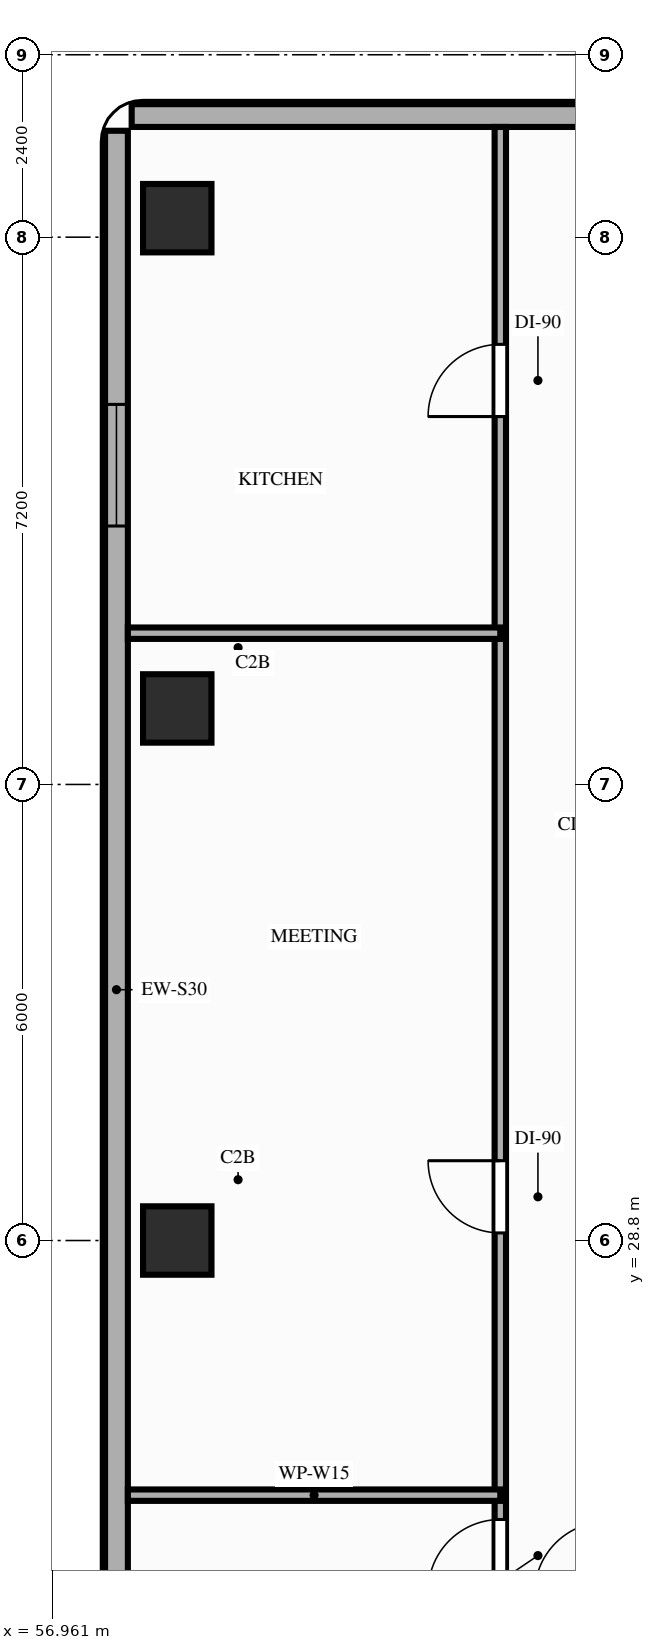
"""IFC4 building model, lengths in metres.
Left out: names, types, materials, properties, quantities, classifications, styles, units other than length and angle.
Written with IfcOpenShell. Run it as: python <this file> out.ifc"""

import sys

from ifc_helpers import new_model, si_unit, direction, frame, frame_2d, origin, origin_2d, place, context, subcontext, project, spatial, rectangle, extrude, element, fill, save


model = new_model("IFC4")
c1 = context("Model", 3, precision=1e-05, world=origin(), true_north=direction((0.0, 1.0)))
c2 = subcontext(c1, "Body", "Model", "MODEL_VIEW")
j1 = project(units=[si_unit("LENGTHUNIT", "METRE"), si_unit("PLANEANGLEUNIT", "RADIAN")], contexts=[c1])
p1 = place(None, origin())
s1 = spatial("IfcSite", under=j1, at=p1, CompositionType="ELEMENT")
p2 = place(p1, origin())
s2 = spatial("IfcBuilding", under=s1, at=p2, CompositionType="ELEMENT")
p3 = place(p2, frame((0.0, 0.0, 69.2)))
s3 = spatial("IfcBuildingStorey", under=s2, at=p3, CompositionType="ELEMENT", Elevation=69.2)
for number, where, z_axis, x_axis in (
    (1, (58.6, 28.8, 0.0), (0.0, 0.0, 1.0), (1.0, 0.0, 0.0)),
    (2, (58.6, 35.8, 0.0), (0.0, 0.0, 1.0), (1.0, 0.0, 0.0)),
    (3, (58.6, 42.25, 0.0), (0.0, 0.0, 1.0), (1.0, 0.0, 0.0)),
):
    element("IfcColumn", number, at=place(p3, frame(where, z_axis=z_axis, x_axis=x_axis)), inside=s3, PredefinedType="COLUMN", context=c2, shape_type="SweptSolid", body=[
        extrude(rectangle(XDim=0.9, YDim=0.9, at=origin_2d()), origin(), (0.0, 0.0, 1.0), 3.2),
    ])
p4 = place(p3, frame((57.8, 43.4, 0.0), z_axis=(0.0, 0.0, 1.0), x_axis=(0.0, -1.0, 0.0)))
e4 = element("IfcWall", 4, at=p4, inside=s3, PredefinedType="STANDARD", context=c2, shape_type="SweptSolid", body=[
    extrude(rectangle(XDim=22.6, YDim=0.3, at=frame_2d((11.3, 0.0))), origin(), (0.0, 0.0, 1.0), 2.6),
])
p5 = place(p4, frame((3.6, 0.0, 0.85)))
e5 = element("IfcOpeningElement", 5, at=p5, cuts=e4, PredefinedType="OPENING", context=c2, shape_type="SweptSolid", body=[
    extrude(rectangle(XDim=1.6, YDim=1.45, at=frame_2d((0.8, 0.725))), frame((0.0, 0.16, 0.0), z_axis=(0.0, -1.0, 0.0), x_axis=(1.0, 0.0, 0.0)), (0.0, 0.0, 1.0), 0.32),
])
p6 = place(p3, frame((72.8, 43.6, 0.0), z_axis=(0.0, 0.0, 1.0), x_axis=(-1.0, 0.0, 0.0)))
e6 = element("IfcWall", 6, at=p6, inside=s3, PredefinedType="STANDARD", context=c2, shape_type="SweptSolid", body=[
    extrude(rectangle(XDim=14.8, YDim=0.3, at=frame_2d((7.4, 0.0))), origin(), (0.0, 0.0, 1.0), 3.02),
])
p7 = place(p3, frame((62.85, 20.75, 0.0), z_axis=(0.0, 0.0, 1.0), x_axis=(0.0, 1.0, 0.0)))
e7 = element("IfcWall", 7, at=p7, inside=s3, PredefinedType="PARTITIONING", context=c2, shape_type="SweptSolid", body=[
    extrude(rectangle(XDim=22.7, YDim=0.15, at=frame_2d((11.35, 0.0))), origin(), (0.0, 0.0, 1.0), 2.6),
])
p8 = place(p7, frame((0.73, 0.0, 0.0)))
e8 = element("IfcOpeningElement", 8, at=p8, cuts=e7, PredefinedType="OPENING", context=c2, shape_type="SweptSolid", body=[
    extrude(rectangle(XDim=0.85, YDim=2.1, at=frame_2d((0.425, 1.05))), frame((0.0, 0.085, 0.0), z_axis=(0.0, -1.0, 0.0), x_axis=(1.0, 0.0, 0.0)), (0.0, 0.0, 1.0), 0.17),
])
p9 = place(p7, frame((3.43, 0.0, 0.0)))
e9 = element("IfcOpeningElement", 9, at=p9, cuts=e7, PredefinedType="OPENING", context=c2, shape_type="SweptSolid", body=[
    extrude(rectangle(XDim=0.95, YDim=2.1, at=frame_2d((0.475, 1.05))), frame((0.0, 0.085, 0.0), z_axis=(0.0, -1.0, 0.0), x_axis=(1.0, 0.0, 0.0)), (0.0, 0.0, 1.0), 0.17),
])
p10 = place(p7, frame((8.15, 0.0, 0.0)))
e10 = element("IfcOpeningElement", 10, at=p10, cuts=e7, PredefinedType="OPENING", context=c2, shape_type="SweptSolid", body=[
    extrude(rectangle(XDim=0.95, YDim=2.15, at=frame_2d((0.475, 1.075))), frame((0.0, 0.085, 0.0), z_axis=(0.0, -1.0, 0.0), x_axis=(1.0, 0.0, 0.0)), (0.0, 0.0, 1.0), 0.17),
])
p11 = place(p7, frame((18.89, 0.0, 0.0)))
e11 = element("IfcOpeningElement", 11, at=p11, cuts=e7, PredefinedType="OPENING", context=c2, shape_type="SweptSolid", body=[
    extrude(rectangle(XDim=0.95, YDim=2.15, at=frame_2d((0.475, 1.075))), frame((0.0, 0.085, 0.0), z_axis=(0.0, -1.0, 0.0), x_axis=(1.0, 0.0, 0.0)), (0.0, 0.0, 1.0), 0.17),
])
for number, where, z_axis, x_axis in (
    (12, (57.95, 25.45, 0.0), (0.0, 0.0, 1.0), (1.0, 0.0, 0.0)),
    (13, (57.95, 36.79, 0.0), (0.0, 0.0, 1.0), (1.0, 0.0, 0.0)),
):
    element("IfcWall", number, at=place(p3, frame(where, z_axis=z_axis, x_axis=x_axis)), inside=s3, PredefinedType="PARTITIONING", context=c2, shape_type="SweptSolid", body=[
        extrude(rectangle(XDim=4.9, YDim=0.15, at=frame_2d((2.45, 0.0))), origin(), (0.0, 0.0, 1.0), 2.6),
    ])
p12 = place(p5, origin())
e14 = element("IfcWindow", 14, at=p12, inside=s3, PartitioningType="SINGLE_PANEL", PredefinedType="WINDOW", context=c2, shape_type="SweptSolid", body=[
    extrude(rectangle(XDim=1.6, YDim=1.45, at=frame_2d((0.8, 0.725))), frame((0.0, 0.03, 0.0), z_axis=(0.0, -1.0, 0.0), x_axis=(1.0, 0.0, 0.0)), (0.0, 0.0, 1.0), 0.06),
])
fill(e5, e14)
p13 = place(p9, origin())
e15 = element("IfcDoor", 15, at=p13, inside=s3, OperationType="SINGLE_SWING_LEFT", PredefinedType="DOOR", context=c2, shape_type="SweptSolid", body=[
    extrude(rectangle(XDim=0.95, YDim=2.1, at=frame_2d((0.475, 1.05))), frame((0.0, 0.025, 0.0), z_axis=(0.0, -1.0, 0.0), x_axis=(1.0, 0.0, 0.0)), (0.0, 0.0, 1.0), 0.05),
])
fill(e9, e15)
p14 = place(p10, origin())
e16 = element("IfcDoor", 16, at=p14, inside=s3, OperationType="SINGLE_SWING_RIGHT", PredefinedType="DOOR", context=c2, shape_type="SweptSolid", body=[
    extrude(rectangle(XDim=0.95, YDim=2.15, at=frame_2d((0.475, 1.075))), frame((0.0, 0.025, 0.0), z_axis=(0.0, -1.0, 0.0), x_axis=(1.0, 0.0, 0.0)), (0.0, 0.0, 1.0), 0.05),
])
fill(e10, e16)
p15 = place(p11, origin())
e17 = element("IfcDoor", 17, at=p15, inside=s3, OperationType="SINGLE_SWING_LEFT", PredefinedType="DOOR", context=c2, shape_type="SweptSolid", body=[
    extrude(rectangle(XDim=0.95, YDim=2.15, at=frame_2d((0.475, 1.075))), frame((0.0, 0.025, 0.0), z_axis=(0.0, -1.0, 0.0), x_axis=(1.0, 0.0, 0.0)), (0.0, 0.0, 1.0), 0.05),
])
fill(e11, e17)
save(model, sys.argv[1])
